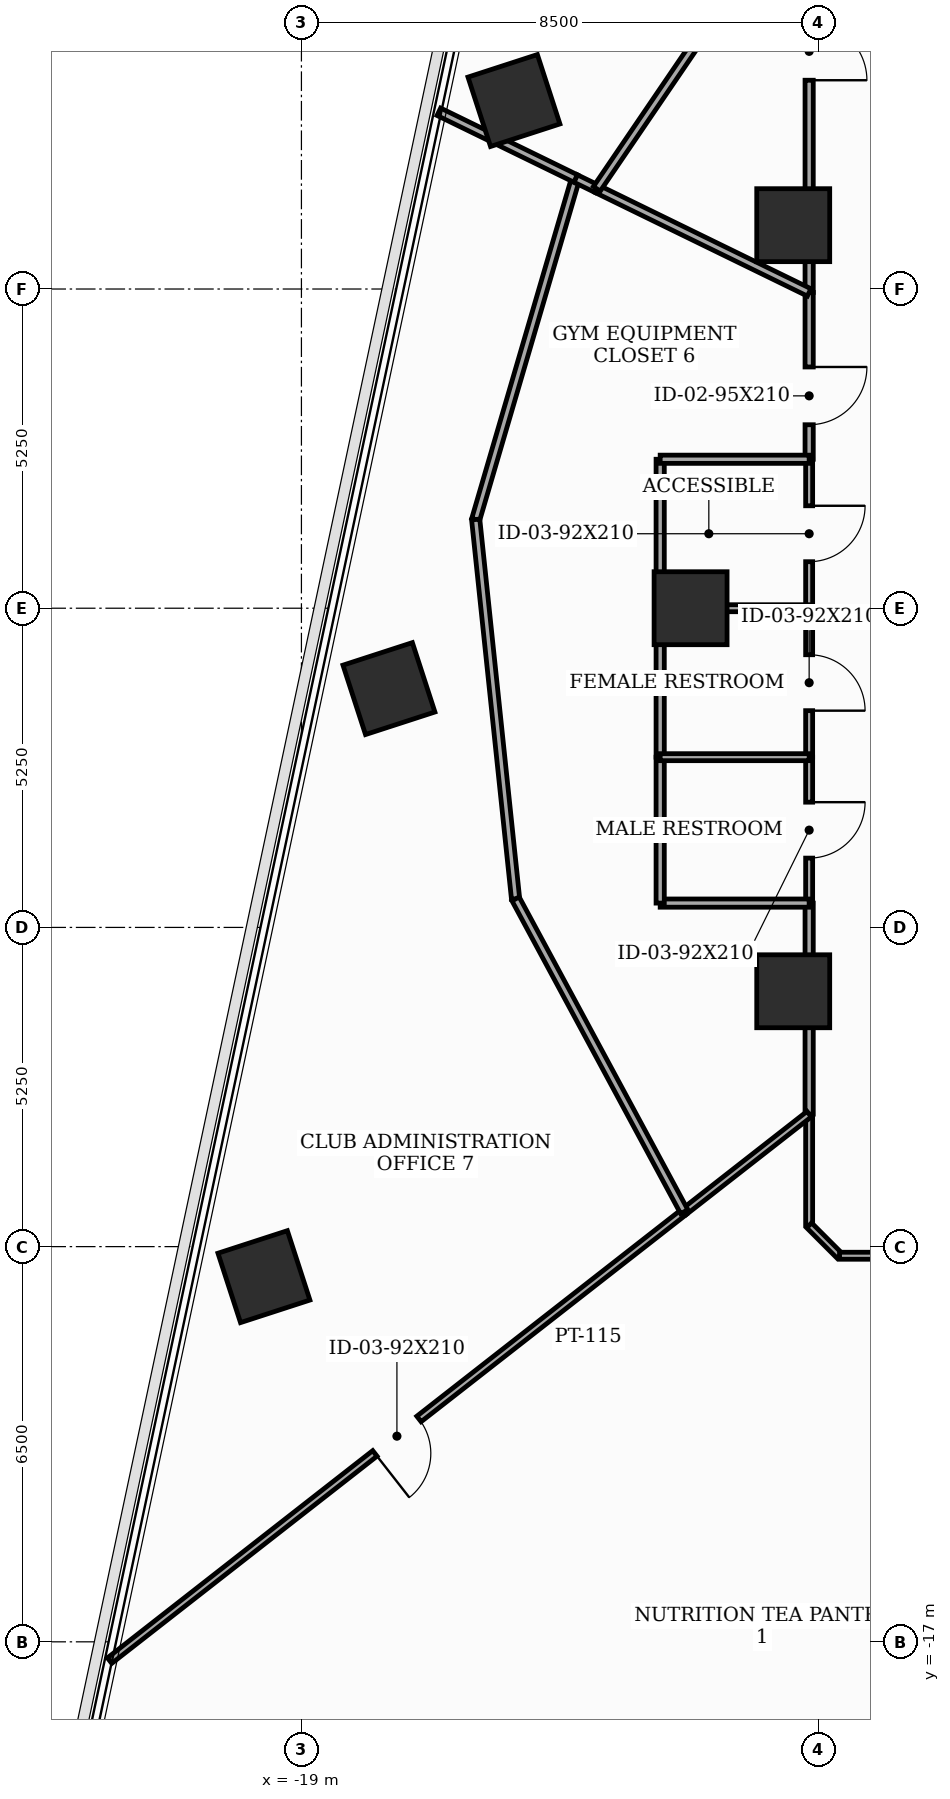
"""IFC4 building model, lengths in metres.
Left out: names, types, materials, properties, quantities, classifications, styles, units other than length and angle.
Written with IfcOpenShell. Run it as: python <this file> out.ifc"""

import sys

from ifc_helpers import new_model, si_unit, direction, frame, frame_2d, origin, origin_2d, place, context, subcontext, project, spatial, rectangle, extrude, element, fill, save


model = new_model("IFC4")
c1 = context("Model", 3, precision=1e-05, world=origin(), true_north=direction((0.0, 1.0)))
c2 = subcontext(c1, "Body", "Model", "MODEL_VIEW")
j1 = project(units=[si_unit("LENGTHUNIT", "METRE"), si_unit("PLANEANGLEUNIT", "RADIAN")], contexts=[c1])
p1 = place(None, origin())
s1 = spatial("IfcSite", under=j1, at=p1, CompositionType="ELEMENT")
p2 = place(p1, origin())
s2 = spatial("IfcBuilding", under=s1, at=p2, CompositionType="ELEMENT")
p3 = place(p2, frame((0.0, 0.0, 101.4)))
s3 = spatial("IfcBuildingStorey", under=s2, at=p3, CompositionType="ELEMENT", Elevation=101.4)
for number, where, z_axis, x_axis in (
    (1, (-10.912, 6.3, 0.0), (0.0, 0.0, 1.0), (1.0, 0.0, 0.0)),
    (2, (-12.6, 0.0, 0.0), (0.0, 0.0, 1.0), (1.0, 0.0, 0.0)),
    (3, (-10.912, -6.3, 0.0), (0.0, 0.0, 1.0), (1.0, 0.0, 0.0)),
    (4, (-15.505, 8.35, 0.0), (0.0, 0.0, 1.0), (0.951, 0.309, 0.0)),
    (5, (-17.561, -1.322, 0.0), (0.0, 0.0, 1.0), (0.951, 0.309, 0.0)),
    (6, (-19.616, -10.994, 0.0), (0.0, 0.0, 1.0), (0.951, 0.309, 0.0)),
):
    element("IfcColumn", number, at=place(p3, frame(where, z_axis=z_axis, x_axis=x_axis)), inside=s3, PredefinedType="COLUMN", context=c2, shape_type="SweptSolid", body=[
        extrude(rectangle(XDim=1.2, YDim=1.2, at=origin_2d()), origin(), (0.0, 0.0, 1.0), 3.7),
    ])
p4 = place(p3, frame((-10.65, -8.321, 0.0), z_axis=(0.0, 0.0, 1.0), x_axis=(0.0, -1.0, 0.0)))
e7 = element("IfcWall", 7, at=p4, inside=s3, PredefinedType="PARTITIONING", context=c2, shape_type="SweptSolid", body=[
    extrude(rectangle(XDim=1.829, YDim=0.115, at=frame_2d((0.915, 0.0))), origin(), (0.0, 0.0, 1.0), 3.5),
])
p5 = place(p3, frame((-10.65, -10.15, 0.0), z_axis=(0.0, 0.0, 1.0), x_axis=(0.707106781187, -0.707106781187, 0.0)))
e8 = element("IfcWall", 8, at=p5, inside=s3, PredefinedType="PARTITIONING", context=c2, shape_type="SweptSolid", body=[
    extrude(rectangle(XDim=0.707, YDim=0.115, at=frame_2d((0.354, 0.0))), origin(), (0.0, 0.0, 1.0), 3.5),
])
p6 = place(p3, frame((-10.15, -10.65, 0.0), z_axis=(0.0, 0.0, 1.0), x_axis=(1.0, 0.0, 0.0)))
e9 = element("IfcWall", 9, at=p6, inside=s3, PredefinedType="PARTITIONING", context=c2, shape_type="SweptSolid", body=[
    extrude(rectangle(XDim=6.158, YDim=0.115, at=frame_2d((3.079, 0.0))), origin(), (0.0, 0.0, 1.0), 2.785),
])
p7 = place(p3, frame((-10.65, -4.85, 0.0), z_axis=(0.0, 0.0, 1.0), x_axis=(0.0, -1.0, 0.0)))
e10 = element("IfcWall", 10, at=p7, inside=s3, PredefinedType="PARTITIONING", context=c2, shape_type="SweptSolid", body=[
    extrude(rectangle(XDim=3.471, YDim=0.135, at=frame_2d((1.735, 0.0))), origin(), (0.0, 0.0, 1.0), 2.785),
])
p8 = place(p3, frame((-10.65, 5.194, 0.0), z_axis=(0.0, 0.0, 1.0), x_axis=(0.0, -1.0, 0.0)))
e11 = element("IfcWall", 11, at=p8, inside=s3, PredefinedType="PARTITIONING", context=c2, shape_type="SweptSolid", body=[
    extrude(rectangle(XDim=2.744, YDim=0.135, at=frame_2d((1.372, 0.0))), origin(), (0.0, 0.0, 1.0), 3.5),
])
p9 = place(p8, frame((1.226, 0.0, 0.0)))
e12 = element("IfcOpeningElement", 12, at=p9, cuts=e11, PredefinedType="OPENING", context=c2, shape_type="SweptSolid", body=[
    extrude(rectangle(XDim=0.95, YDim=2.1, at=frame_2d((0.475, 1.05))), frame((0.0, 0.077, 0.0), z_axis=(0.0, -1.0, 0.0), x_axis=(1.0, 0.0, 0.0)), (0.0, 0.0, 1.0), 0.155),
])
p10 = place(p3, frame((-10.65, 0.0, 0.0), z_axis=(0.0, 0.0, 1.0), x_axis=(0.0, -1.0, 0.0)))
e13 = element("IfcWall", 13, at=p10, inside=s3, PredefinedType="PARTITIONING", context=c2, shape_type="SweptSolid", body=[
    extrude(rectangle(XDim=2.45, YDim=0.115, at=frame_2d((1.225, 0.0))), origin(), (0.0, 0.0, 1.0), 2.785),
])
p11 = place(p10, frame((0.765, 0.0, 0.0)))
e14 = element("IfcOpeningElement", 14, at=p11, cuts=e13, PredefinedType="OPENING", context=c2, shape_type="SweptSolid", body=[
    extrude(rectangle(XDim=0.92, YDim=2.1, at=frame_2d((0.46, 1.05))), frame((0.0, 0.067, 0.0), z_axis=(0.0, -1.0, 0.0), x_axis=(1.0, 0.0, 0.0)), (0.0, 0.0, 1.0), 0.135),
])
p12 = place(p3, frame((-10.65, -2.45, 0.0), z_axis=(0.0, 0.0, 1.0), x_axis=(0.0, -1.0, 0.0)))
e15 = element("IfcWall", 15, at=p12, inside=s3, PredefinedType="PARTITIONING", context=c2, shape_type="SweptSolid", body=[
    extrude(rectangle(XDim=2.4, YDim=0.115, at=frame_2d((1.2, 0.0))), origin(), (0.0, 0.0, 1.0), 3.5),
])
p13 = place(p12, frame((0.74, 0.0, 0.0)))
e16 = element("IfcOpeningElement", 16, at=p13, cuts=e15, PredefinedType="OPENING", context=c2, shape_type="SweptSolid", body=[
    extrude(rectangle(XDim=0.92, YDim=2.1, at=frame_2d((0.46, 1.05))), frame((0.0, 0.067, 0.0), z_axis=(0.0, -1.0, 0.0), x_axis=(1.0, 0.0, 0.0)), (0.0, 0.0, 1.0), 0.135),
])
p14 = place(p3, frame((-10.65, 10.15, 0.0), z_axis=(0.0, 0.0, 1.0), x_axis=(0.0, -1.0, 0.0)))
e17 = element("IfcWall", 17, at=p14, inside=s3, PredefinedType="PARTITIONING", context=c2, shape_type="SweptSolid", body=[
    extrude(rectangle(XDim=4.956, YDim=0.135, at=frame_2d((2.478, 0.0))), origin(), (0.0, 0.0, 1.0), 2.785),
])
p15 = place(p14, frame((0.516, 0.0, 0.0)))
e18 = element("IfcOpeningElement", 18, at=p15, cuts=e17, PredefinedType="OPENING", context=c2, shape_type="SweptSolid", body=[
    extrude(rectangle(XDim=0.95, YDim=2.1, at=frame_2d((0.475, 1.05))), frame((0.0, 0.077, 0.0), z_axis=(0.0, -1.0, 0.0), x_axis=(1.0, 0.0, 0.0)), (0.0, 0.0, 1.0), 0.155),
])
p16 = place(p3, frame((-10.65, 2.45, 0.0), z_axis=(0.0, 0.0, 1.0), x_axis=(0.0, -1.0, 0.0)))
e19 = element("IfcWall", 19, at=p16, inside=s3, PredefinedType="PARTITIONING", context=c2, shape_type="SweptSolid", body=[
    extrude(rectangle(XDim=2.45, YDim=0.115, at=frame_2d((1.225, 0.0))), origin(), (0.0, 0.0, 1.0), 2.785),
])
p17 = place(p16, frame((0.765, 0.0, 0.0)))
e20 = element("IfcOpeningElement", 20, at=p17, cuts=e19, PredefinedType="OPENING", context=c2, shape_type="SweptSolid", body=[
    extrude(rectangle(XDim=0.92, YDim=2.1, at=frame_2d((0.46, 1.05))), frame((0.0, 0.067, 0.0), z_axis=(0.0, -1.0, 0.0), x_axis=(1.0, 0.0, 0.0)), (0.0, 0.0, 1.0), 0.135),
])
p18 = place(p3, frame((-10.65, -8.321, 0.0), z_axis=(0.0, 0.0, 1.0), x_axis=(-0.787998815749, -0.615676754782, 0.0)))
e21 = element("IfcWall", 21, at=p18, inside=s3, PredefinedType="PARTITIONING", context=c2, shape_type="SweptSolid", body=[
    extrude(rectangle(XDim=2.607, YDim=0.115, at=frame_2d((1.303, 0.0))), origin(), (0.0, 0.0, 1.0), 3.5),
])
p19 = place(p3, frame((-12.704, -9.926, 0.0), z_axis=(0.0, 0.0, 1.0), x_axis=(-0.788033940978, -0.615631795692, 0.0)))
e22 = element("IfcWall", 22, at=p19, inside=s3, PredefinedType="PARTITIONING", context=c2, shape_type="SweptSolid", body=[
    extrude(rectangle(XDim=11.993, YDim=0.115, at=frame_2d((5.997, 0.0))), origin(), (0.0, 0.0, 1.0), 2.935),
])
p20 = place(p19, frame((5.537, 0.0, 0.0)))
e23 = element("IfcOpeningElement", 23, at=p20, cuts=e22, PredefinedType="OPENING", context=c2, shape_type="SweptSolid", body=[
    extrude(rectangle(XDim=0.92, YDim=2.1, at=frame_2d((0.46, 1.05))), frame((0.0, 0.067, 0.0), z_axis=(0.0, -1.0, 0.0), x_axis=(1.0, 0.0, 0.0)), (0.0, 0.0, 1.0), 0.135),
])
p21 = place(p3, frame((-13.1, -2.45, 0.0), z_axis=(0.0, 0.0, 1.0), x_axis=(0.0, 1.0, 0.0)))
e24 = element("IfcWall", 24, at=p21, inside=s3, PredefinedType="PARTITIONING", context=c2, shape_type="SweptSolid", body=[
    extrude(rectangle(XDim=2.45, YDim=0.135, at=frame_2d((1.225, 0.0))), origin(), (0.0, 0.0, 1.0), 2.785),
])
p22 = place(p3, frame((-10.65, -4.85, 0.0), z_axis=(0.0, 0.0, 1.0), x_axis=(-1.0, 0.0, 0.0)))
e25 = element("IfcWall", 25, at=p22, inside=s3, PredefinedType="PARTITIONING", context=c2, shape_type="SweptSolid", body=[
    extrude(rectangle(XDim=2.45, YDim=0.135, at=frame_2d((1.225, 0.0))), origin(), (0.0, 0.0, 1.0), 2.785),
])
p23 = place(p3, frame((-13.1, -4.85, 0.0), z_axis=(0.0, 0.0, 1.0), x_axis=(0.0, 1.0, 0.0)))
e26 = element("IfcWall", 26, at=p23, inside=s3, PredefinedType="PARTITIONING", context=c2, shape_type="SweptSolid", body=[
    extrude(rectangle(XDim=2.4, YDim=0.135, at=frame_2d((1.2, 0.0))), origin(), (0.0, 0.0, 1.0), 3.5),
])
p24 = place(p3, frame((-14.491, 7.068, 0.0), z_axis=(0.0, 0.0, 1.0), x_axis=(-0.28111457881, -0.95967421221, 0.0)))
e27 = element("IfcWall", 27, at=p24, inside=s3, PredefinedType="PARTITIONING", context=c2, shape_type="SweptSolid", body=[
    extrude(rectangle(XDim=5.845, YDim=0.135, at=frame_2d((2.922, 0.0))), origin(), (0.0, 0.0, 1.0), 3.5),
])
p25 = place(p3, frame((-16.134, 1.459, 0.0), z_axis=(0.0, 0.0, 1.0), x_axis=(0.104553126753, -0.994519302822, 0.0)))
e28 = element("IfcWall", 28, at=p25, inside=s3, PredefinedType="PARTITIONING", context=c2, shape_type="SweptSolid", body=[
    extrude(rectangle(XDim=6.274, YDim=0.135, at=frame_2d((3.137, 0.0))), origin(), (0.0, 0.0, 1.0), 2.785),
])
p26 = place(p3, frame((-15.478, -4.781, 0.0), z_axis=(0.0, 0.0, 1.0), x_axis=(0.47456801742, -0.880218834633, 0.0)))
e29 = element("IfcWall", 29, at=p26, inside=s3, PredefinedType="PARTITIONING", context=c2, shape_type="SweptSolid", body=[
    extrude(rectangle(XDim=5.845, YDim=0.135, at=frame_2d((2.923, 0.0))), origin(), (0.0, 0.0, 1.0), 2.785),
])
p27 = place(p3, frame((-14.142, 6.898, 0.0), z_axis=(0.0, 0.0, 1.0), x_axis=(-0.898786579289, 0.438386456098, 0.0)))
e30 = element("IfcWall", 30, at=p27, inside=s3, PredefinedType="PARTITIONING", context=c2, shape_type="SweptSolid", body=[
    extrude(rectangle(XDim=0.388, YDim=0.135, at=frame_2d((0.194, 0.0))), origin(), (0.0, 0.0, 1.0), 3.5),
])
p28 = place(p3, frame((-10.65, 5.194, 0.0), z_axis=(0.0, 0.0, 1.0), x_axis=(-0.898732815367, 0.438496666558, 0.0)))
e31 = element("IfcWall", 31, at=p28, inside=s3, PredefinedType="PARTITIONING", context=c2, shape_type="SweptSolid", body=[
    extrude(rectangle(XDim=3.886, YDim=0.135, at=frame_2d((1.943, 0.0))), origin(), (0.0, 0.0, 1.0), 2.785),
])
p29 = place(p3, frame((-13.1, 0.0, 0.0), z_axis=(0.0, 0.0, 1.0), x_axis=(0.0, 1.0, 0.0)))
e32 = element("IfcWall", 32, at=p29, inside=s3, PredefinedType="PARTITIONING", context=c2, shape_type="SweptSolid", body=[
    extrude(rectangle(XDim=2.45, YDim=0.135, at=frame_2d((1.225, 0.0))), origin(), (0.0, 0.0, 1.0), 2.785),
])
p30 = place(p3, frame((-13.1, 2.45, 0.0), z_axis=(0.0, 0.0, 1.0), x_axis=(1.0, 0.0, 0.0)))
e33 = element("IfcWall", 33, at=p30, inside=s3, PredefinedType="PARTITIONING", context=c2, shape_type="SweptSolid", body=[
    extrude(rectangle(XDim=2.45, YDim=0.135, at=frame_2d((1.225, 0.0))), origin(), (0.0, 0.0, 1.0), 2.785),
])
for number, where, z_axis, x_axis in (
    (34, (-13.1, -2.45, 0.0), (0.0, 0.0, 1.0), (1.0, 0.0, 0.0)),
    (35, (-10.65, 0.0, 0.0), (0.0, 0.0, 1.0), (-1.0, 0.0, 0.0)),
):
    element("IfcWall", number, at=place(p3, frame(where, z_axis=z_axis, x_axis=x_axis)), inside=s3, PredefinedType="PARTITIONING", context=c2, shape_type="SweptSolid", body=[
        extrude(rectangle(XDim=2.45, YDim=0.115, at=frame_2d((1.225, 0.0))), origin(), (0.0, 0.0, 1.0), 2.785),
    ])
p31 = place(p3, frame((-14.491, 7.068, 0.0), z_axis=(0.0, 0.0, 1.0), x_axis=(-0.898774071038, 0.438412099777, 0.0)))
e36 = element("IfcWall", 36, at=p31, inside=s3, PredefinedType="PARTITIONING", context=c2, shape_type="SweptSolid", body=[
    extrude(rectangle(XDim=2.503, YDim=0.135, at=frame_2d((1.251, 0.0))), origin(), (0.0, 0.0, 1.0), 2.935),
])
p32 = place(p3, frame((-14.142, 6.898, 0.0), z_axis=(0.0, 0.0, 1.0), x_axis=(0.562725506953, 0.826643819202, 0.0)))
e37 = element("IfcWall", 37, at=p32, inside=s3, PredefinedType="PARTITIONING", context=c2, shape_type="SweptSolid", body=[
    extrude(rectangle(XDim=4.933, YDim=0.135, at=frame_2d((2.467, 0.0))), origin(), (0.0, 0.0, 1.0), 2.785),
])
p33 = place(p9, origin())
e38 = element("IfcDoor", 38, at=p33, inside=s3, OperationType="SINGLE_SWING_LEFT", PredefinedType="DOOR", context=c2, shape_type="SweptSolid", body=[
    extrude(rectangle(XDim=0.95, YDim=2.1, at=frame_2d((0.475, 1.05))), frame((0.0, 0.025, 0.0), z_axis=(0.0, -1.0, 0.0), x_axis=(1.0, 0.0, 0.0)), (0.0, 0.0, 1.0), 0.05),
])
fill(e12, e38)
p34 = place(p11, origin())
e39 = element("IfcDoor", 39, at=p34, inside=s3, OperationType="SINGLE_SWING_RIGHT", PredefinedType="DOOR", context=c2, shape_type="SweptSolid", body=[
    extrude(rectangle(XDim=0.92, YDim=2.1, at=frame_2d((0.46, 1.05))), frame((0.0, 0.025, 0.0), z_axis=(0.0, -1.0, 0.0), x_axis=(1.0, 0.0, 0.0)), (0.0, 0.0, 1.0), 0.05),
])
fill(e14, e39)
p35 = place(p13, origin())
e40 = element("IfcDoor", 40, at=p35, inside=s3, OperationType="SINGLE_SWING_LEFT", PredefinedType="DOOR", context=c2, shape_type="SweptSolid", body=[
    extrude(rectangle(XDim=0.92, YDim=2.1, at=frame_2d((0.46, 1.05))), frame((0.0, 0.025, 0.0), z_axis=(0.0, -1.0, 0.0), x_axis=(1.0, 0.0, 0.0)), (0.0, 0.0, 1.0), 0.05),
])
fill(e16, e40)
p36 = place(p15, origin())
e41 = element("IfcDoor", 41, at=p36, inside=s3, OperationType="SINGLE_SWING_RIGHT", PredefinedType="DOOR", context=c2, shape_type="SweptSolid", body=[
    extrude(rectangle(XDim=0.95, YDim=2.1, at=frame_2d((0.475, 1.05))), frame((0.0, 0.025, 0.0), z_axis=(0.0, -1.0, 0.0), x_axis=(1.0, 0.0, 0.0)), (0.0, 0.0, 1.0), 0.05),
])
fill(e18, e41)
p37 = place(p17, origin())
e42 = element("IfcDoor", 42, at=p37, inside=s3, OperationType="SINGLE_SWING_LEFT", PredefinedType="DOOR", context=c2, shape_type="SweptSolid", body=[
    extrude(rectangle(XDim=0.92, YDim=2.1, at=frame_2d((0.46, 1.05))), frame((0.0, 0.025, 0.0), z_axis=(0.0, -1.0, 0.0), x_axis=(1.0, 0.0, 0.0)), (0.0, 0.0, 1.0), 0.05),
])
fill(e20, e42)
p38 = place(p20, origin())
e43 = element("IfcDoor", 43, at=p38, inside=s3, OperationType="SINGLE_SWING_RIGHT", PredefinedType="DOOR", context=c2, shape_type="SweptSolid", body=[
    extrude(rectangle(XDim=0.92, YDim=2.1, at=frame_2d((0.46, 1.05))), frame((0.0, 0.025, 0.0), z_axis=(0.0, -1.0, 0.0), x_axis=(1.0, 0.0, 0.0)), (0.0, 0.0, 1.0), 0.05),
])
fill(e23, e43)
save(model, sys.argv[1])
